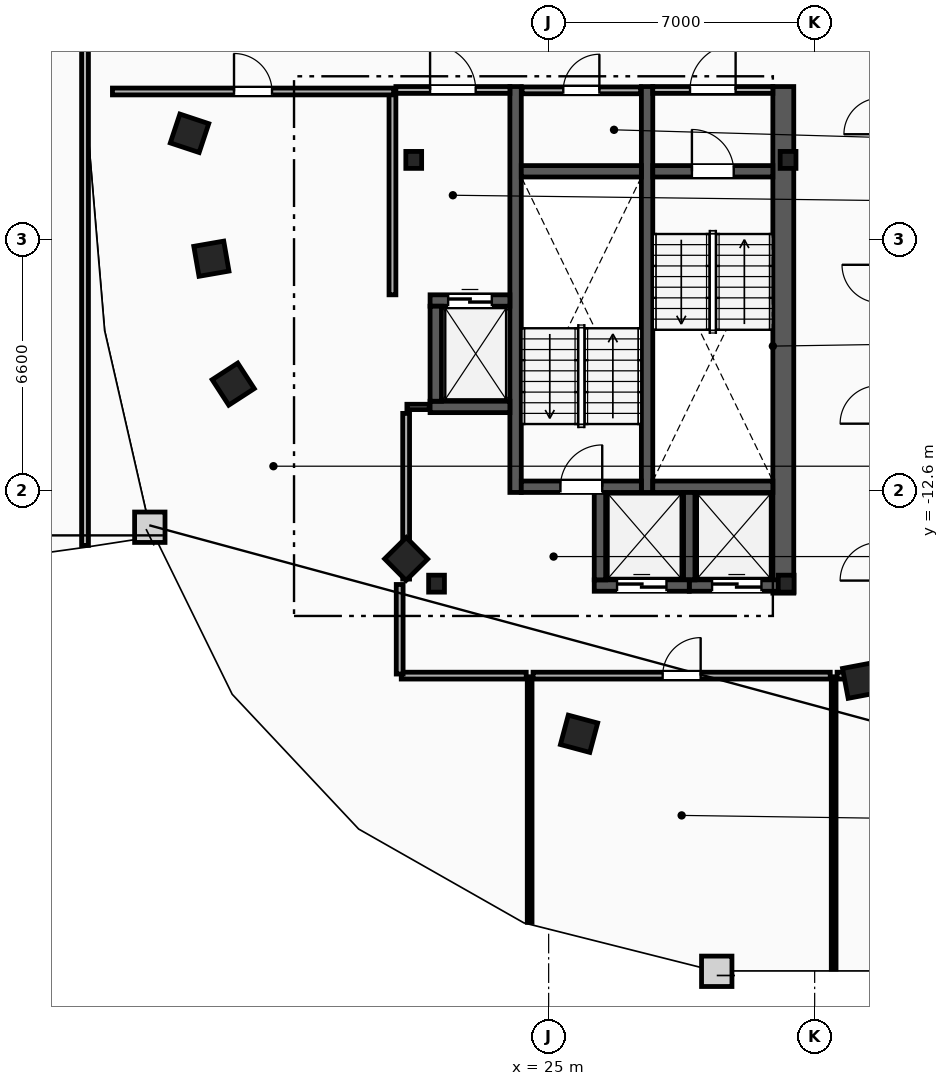
"""IFC4 building model, lengths in metres.
Left out: names, types, materials, properties, quantities, classifications, styles, units other than length and angle.
Written with IfcOpenShell. Run it as: python <this file> out.ifc"""

import sys

from ifc_helpers import new_model, si_unit, direction, frame, frame_2d, origin, origin_2d, place, context, subcontext, project, spatial, rectangle, i_section, extrude, element, fill, save


model = new_model("IFC4")
c1 = context("Model", 3, precision=1e-05, world=origin(), true_north=direction((0.0, 1.0)))
c2 = subcontext(c1, "Body", "Model", "MODEL_VIEW")
j1 = project(units=[si_unit("LENGTHUNIT", "METRE"), si_unit("PLANEANGLEUNIT", "RADIAN")], contexts=[c1])
p1 = place(None, origin())
s1 = spatial("IfcSite", under=j1, at=p1, CompositionType="ELEMENT")
p2 = place(p1, origin())
s2 = spatial("IfcBuilding", under=s1, at=p2, CompositionType="ELEMENT")
p3 = place(p2, frame((0.0, 0.0, 261.2)))
s3 = spatial("IfcBuildingStorey", under=s2, at=p3, CompositionType="ELEMENT", Elevation=261.2)
for number, where, z_axis, x_axis in (
    (1, (31.3, -3.9, 0.0), (0.0, 0.0, 1.0), (1.0, 0.0, 0.0)),
    (2, (21.45, -3.9, 0.0), (0.0, 0.0, 1.0), (1.0, 0.0, 0.0)),
    (3, (22.05, -15.05, 0.0), (0.0, 0.0, 1.0), (1.0, 0.0, 0.0)),
    (4, (31.25, -15.05, 0.0), (0.0, 0.0, 1.0), (1.0, 0.0, 0.0)),
):
    element("IfcColumn", number, at=place(p3, frame(where, z_axis=z_axis, x_axis=x_axis)), inside=s3, PredefinedType="COLUMN", context=c2, shape_type="SweptSolid", body=[
        extrude(i_section(OverallWidth=0.416, OverallDepth=0.446, WebThickness=0.039, FlangeThickness=0.063, FilletRadius=0.018, at=origin_2d()), origin(), (0.0, 0.0, 1.0), 3.6),
    ])
for number, where, z_axis, x_axis in (
    (5, (15.55, -3.2, 0.0), (0.0, 0.0, 1.0), (-0.315, -0.949, 0.0)),
    (6, (16.125, -6.5, 0.0), (0.0, 0.0, 1.0), (0.172, -0.985, 0.0)),
    (7, (16.7, -9.8, 0.0), (0.0, 0.0, 1.0), (0.544, -0.839, 0.0)),
    (8, (21.25, -14.4, 0.0), (0.0, 0.0, 1.0), (0.703, -0.711, 0.0)),
    (9, (25.8, -19.0, 0.0), (0.0, 0.0, 1.0), (0.966, -0.259, 0.0)),
    (10, (33.2, -17.6, 0.0), (0.0, 0.0, 1.0), (0.983, 0.186, 0.0)),
):
    element("IfcColumn", number, at=place(p3, frame(where, z_axis=z_axis, x_axis=x_axis)), inside=s3, PredefinedType="COLUMN", context=c2, shape_type="SweptSolid", body=[
        extrude(rectangle(XDim=0.8, YDim=0.8, at=origin_2d()), origin(), (0.0, 0.0, 1.0), 3.6),
    ])
p4 = place(p3, frame((31.175, -15.3, 0.0), z_axis=(0.0, 0.0, 1.0), x_axis=(0.0, 1.0, 0.0)))
e11 = element("IfcWall", 11, at=p4, inside=s3, PredefinedType="SHEAR", context=c2, shape_type="SweptSolid", body=[
    extrude(rectangle(XDim=13.33, YDim=0.55, at=frame_2d((6.665, 0.0))), origin(), (0.0, 0.0, 1.0), 3.34),
])
for number, where, z_axis, x_axis in (
    (12, (27.59, -12.65, 0.0), (0.0, 0.0, 1.0), (0.0, 1.0, 0.0)),
    (13, (24.13, -12.65, 0.0), (0.0, 0.0, 1.0), (0.0, 1.0, 0.0)),
):
    element("IfcWall", number, at=place(p3, frame(where, z_axis=z_axis, x_axis=x_axis)), inside=s3, PredefinedType="SHEAR", context=c2, shape_type="SweptSolid", body=[
        extrude(rectangle(XDim=10.68, YDim=0.3, at=frame_2d((5.34, 0.0))), origin(), (0.0, 0.0, 1.0), 3.34),
    ])
p5 = place(p3, frame((27.74, -4.2, 0.0), z_axis=(0.0, 0.0, 1.0), x_axis=(1.0, 0.0, 0.0)))
e14 = element("IfcWall", 14, at=p5, inside=s3, PredefinedType="SHEAR", context=c2, shape_type="SweptSolid", body=[
    extrude(rectangle(XDim=3.16, YDim=0.3, at=frame_2d((1.58, 0.0))), origin(), (0.0, 0.0, 1.0), 3.34),
])
p6 = place(p5, frame((1.03, 0.0, 0.0)))
e15 = element("IfcOpeningElement", 15, at=p6, cuts=e14, PredefinedType="OPENING", context=c2, shape_type="SweptSolid", body=[
    extrude(rectangle(XDim=1.1, YDim=2.15, at=frame_2d((0.55, 1.075))), frame((0.0, 0.16, 0.0), z_axis=(0.0, -1.0, 0.0), x_axis=(1.0, 0.0, 0.0)), (0.0, 0.0, 1.0), 0.32),
])
p7 = place(p3, frame((27.74, -12.5, 0.0), z_axis=(0.0, 0.0, 1.0), x_axis=(1.0, 0.0, 0.0)))
e16 = element("IfcWall", 16, at=p7, inside=s3, PredefinedType="SHEAR", context=c2, shape_type="SweptSolid", body=[
    extrude(rectangle(XDim=3.16, YDim=0.3, at=frame_2d((1.58, 0.0))), origin(), (0.0, 0.0, 1.0), 3.34),
])
p8 = place(p3, frame((24.28, -12.5, 0.0), z_axis=(0.0, 0.0, 1.0), x_axis=(1.0, 0.0, 0.0)))
e17 = element("IfcWall", 17, at=p8, inside=s3, PredefinedType="SHEAR", context=c2, shape_type="SweptSolid", body=[
    extrude(rectangle(XDim=3.16, YDim=0.3, at=frame_2d((1.58, 0.0))), origin(), (0.0, 0.0, 1.0), 3.34),
])
p9 = place(p8, frame((1.03, 0.0, 0.0)))
e18 = element("IfcOpeningElement", 18, at=p9, cuts=e17, PredefinedType="OPENING", context=c2, shape_type="SweptSolid", body=[
    extrude(rectangle(XDim=1.1, YDim=2.15, at=frame_2d((0.55, 1.075))), frame((0.0, 0.16, 0.0), z_axis=(0.0, -1.0, 0.0), x_axis=(1.0, 0.0, 0.0)), (0.0, 0.0, 1.0), 0.32),
])
p10 = place(p3, frame((24.28, -4.2, 0.0), z_axis=(0.0, 0.0, 1.0), x_axis=(1.0, 0.0, 0.0)))
e19 = element("IfcWall", 19, at=p10, inside=s3, PredefinedType="SHEAR", context=c2, shape_type="SweptSolid", body=[
    extrude(rectangle(XDim=3.16, YDim=0.3, at=frame_2d((1.58, 0.0))), origin(), (0.0, 0.0, 1.0), 3.34),
])
p11 = place(p3, frame((20.89, -7.45, 0.0), z_axis=(0.0, 0.0, 1.0), x_axis=(0.0, 1.0, 0.0)))
e20 = element("IfcWall", 20, at=p11, inside=s3, PredefinedType="PARTITIONING", context=c2, shape_type="SweptSolid", body=[
    extrude(rectangle(XDim=5.3, YDim=0.18, at=frame_2d((2.65, 0.0))), origin(), (0.0, 0.0, 1.0), 3.34),
])
p12 = place(p3, frame((20.98, -2.06, 0.0), z_axis=(0.0, 0.0, 1.0), x_axis=(1.0, 0.0, 0.0)))
e21 = element("IfcWall", 21, at=p12, inside=s3, PredefinedType="PARTITIONING", context=c2, shape_type="SweptSolid", body=[
    extrude(rectangle(XDim=3.0, YDim=0.18, at=frame_2d((1.5, 0.0))), origin(), (0.0, 0.0, 1.0), 3.34),
])
p13 = place(p12, frame((0.9, 0.0, 0.0)))
e22 = element("IfcOpeningElement", 22, at=p13, cuts=e21, PredefinedType="OPENING", context=c2, shape_type="SweptSolid", body=[
    extrude(rectangle(XDim=1.2, YDim=2.15, at=frame_2d((0.6, 1.075))), frame((0.0, 0.1, 0.0), z_axis=(0.0, -1.0, 0.0), x_axis=(1.0, 0.0, 0.0)), (0.0, 0.0, 1.0), 0.2),
])
p14 = place(p3, frame((27.74, -2.06, 0.0), z_axis=(0.0, 0.0, 1.0), x_axis=(1.0, 0.0, 0.0)))
e23 = element("IfcWall", 23, at=p14, inside=s3, PredefinedType="PARTITIONING", context=c2, shape_type="SweptSolid", body=[
    extrude(rectangle(XDim=3.16, YDim=0.18, at=frame_2d((1.58, 0.0))), origin(), (0.0, 0.0, 1.0), 3.34),
])
p15 = place(p14, frame((0.98, 0.0, 0.0)))
e24 = element("IfcOpeningElement", 24, at=p15, cuts=e23, PredefinedType="OPENING", context=c2, shape_type="SweptSolid", body=[
    extrude(rectangle(XDim=1.2, YDim=2.15, at=frame_2d((0.6, 1.075))), frame((0.0, 0.1, 0.0), z_axis=(0.0, -1.0, 0.0), x_axis=(1.0, 0.0, 0.0)), (0.0, 0.0, 1.0), 0.2),
])
p16 = place(p3, frame((21.88, -7.6, 0.0), z_axis=(0.0, 0.0, 1.0), x_axis=(1.0, 0.0, 0.0)))
e25 = element("IfcWall", 25, at=p16, inside=s3, PredefinedType="SHEAR", context=c2, shape_type="SweptSolid", body=[
    extrude(rectangle(XDim=2.1, YDim=0.3, at=frame_2d((1.05, 0.0))), origin(), (0.0, 0.0, 1.0), 3.34),
])
p17 = place(p16, frame((0.475, 0.0, 0.0)))
e26 = element("IfcOpeningElement", 26, at=p17, cuts=e25, PredefinedType="OPENING", context=c2, shape_type="SweptSolid", body=[
    extrude(rectangle(XDim=1.15, YDim=2.2, at=frame_2d((0.575, 1.1))), frame((0.0, 0.16, 0.0), z_axis=(0.0, -1.0, 0.0), x_axis=(1.0, 0.0, 0.0)), (0.0, 0.0, 1.0), 0.32),
])
p18 = place(p3, frame((21.88, -10.4, 0.0), z_axis=(0.0, 0.0, 1.0), x_axis=(1.0, 0.0, 0.0)))
e27 = element("IfcWall", 27, at=p18, inside=s3, PredefinedType="SHEAR", context=c2, shape_type="SweptSolid", body=[
    extrude(rectangle(XDim=2.1, YDim=0.3, at=frame_2d((1.05, 0.0))), origin(), (0.0, 0.0, 1.0), 3.34),
])
p19 = place(p3, frame((22.03, -10.25, 0.0), z_axis=(0.0, 0.0, 1.0), x_axis=(0.0, 1.0, 0.0)))
e28 = element("IfcWall", 28, at=p19, inside=s3, PredefinedType="SHEAR", context=c2, shape_type="SweptSolid", body=[
    extrude(rectangle(XDim=2.5, YDim=0.3, at=frame_2d((1.25, 0.0))), origin(), (0.0, 0.0, 1.0), 3.34),
])
p20 = place(p3, frame((28.7, -15.1, 0.0), z_axis=(0.0, 0.0, 1.0), x_axis=(1.0, 0.0, 0.0)))
e29 = element("IfcWall", 29, at=p20, inside=s3, PredefinedType="SHEAR", context=c2, shape_type="SweptSolid", body=[
    extrude(rectangle(XDim=2.5, YDim=0.3, at=frame_2d((1.25, 0.0))), origin(), (0.0, 0.0, 1.0), 3.34),
])
p21 = place(p20, frame((0.6, 0.0, 0.0)))
e30 = element("IfcOpeningElement", 30, at=p21, cuts=e29, PredefinedType="OPENING", context=c2, shape_type="SweptSolid", body=[
    extrude(rectangle(XDim=1.3, YDim=2.2, at=frame_2d((0.65, 1.1))), frame((0.0, 0.16, 0.0), z_axis=(0.0, -1.0, 0.0), x_axis=(1.0, 0.0, 0.0)), (0.0, 0.0, 1.0), 0.32),
])
p22 = place(p3, frame((28.7, -14.95, 0.0), z_axis=(0.0, 0.0, 1.0), x_axis=(0.0, 1.0, 0.0)))
e31 = element("IfcWall", 31, at=p22, inside=s3, PredefinedType="SHEAR", context=c2, shape_type="SweptSolid", body=[
    extrude(rectangle(XDim=2.3, YDim=0.3, at=frame_2d((1.15, 0.0))), origin(), (0.0, 0.0, 1.0), 3.34),
])
p23 = place(p3, frame((26.2, -15.1, 0.0), z_axis=(0.0, 0.0, 1.0), x_axis=(1.0, 0.0, 0.0)))
e32 = element("IfcWall", 32, at=p23, inside=s3, PredefinedType="SHEAR", context=c2, shape_type="SweptSolid", body=[
    extrude(rectangle(XDim=2.5, YDim=0.3, at=frame_2d((1.25, 0.0))), origin(), (0.0, 0.0, 1.0), 3.34),
])
p24 = place(p23, frame((0.6, 0.0, 0.0)))
e33 = element("IfcOpeningElement", 33, at=p24, cuts=e32, PredefinedType="OPENING", context=c2, shape_type="SweptSolid", body=[
    extrude(rectangle(XDim=1.3, YDim=2.2, at=frame_2d((0.65, 1.1))), frame((0.0, 0.16, 0.0), z_axis=(0.0, -1.0, 0.0), x_axis=(1.0, 0.0, 0.0)), (0.0, 0.0, 1.0), 0.32),
])
p25 = place(p3, frame((26.35, -14.95, 0.0), z_axis=(0.0, 0.0, 1.0), x_axis=(0.0, 1.0, 0.0)))
e34 = element("IfcWall", 34, at=p25, inside=s3, PredefinedType="SHEAR", context=c2, shape_type="SweptSolid", body=[
    extrude(rectangle(XDim=2.3, YDim=0.3, at=frame_2d((1.15, 0.0))), origin(), (0.0, 0.0, 1.0), 3.34),
])
p26 = place(p3, frame((21.27, -10.4, 0.0), z_axis=(0.0, 0.0, 1.0), x_axis=(1.0, 0.0, 0.0)))
e35 = element("IfcWall", 35, at=p26, inside=s3, PredefinedType="PARTITIONING", context=c2, shape_type="SweptSolid", body=[
    extrude(rectangle(XDim=0.59, YDim=0.14, at=frame_2d((0.295, 0.0))), origin(), (0.0, 0.0, 1.0), 3.34),
])
p27 = place(p3, frame((21.25, -14.93, 0.0), z_axis=(0.0, 0.0, 1.0), x_axis=(0.0, 1.0, 0.0)))
e36 = element("IfcWall", 36, at=p27, inside=s3, PredefinedType="PARTITIONING", context=c2, shape_type="SweptSolid", body=[
    extrude(rectangle(XDim=4.36, YDim=0.18, at=frame_2d((2.18, 0.0))), origin(), (0.0, 0.0, 1.0), 3.34),
])
p28 = place(p3, frame((24.3, -2.07, 0.0), z_axis=(0.0, 0.0, 1.0), x_axis=(1.0, 0.0, 0.0)))
e37 = element("IfcWall", 37, at=p28, inside=s3, PredefinedType="PARTITIONING", context=c2, shape_type="SweptSolid", body=[
    extrude(rectangle(XDim=3.12, YDim=0.18, at=frame_2d((1.56, 0.0))), origin(), (0.0, 0.0, 1.0), 3.34),
])
p29 = place(p28, frame((1.085, 0.0, 0.0)))
e38 = element("IfcOpeningElement", 38, at=p29, cuts=e37, PredefinedType="OPENING", context=c2, shape_type="SweptSolid", body=[
    extrude(rectangle(XDim=0.95, YDim=2.1, at=frame_2d((0.475, 1.05))), frame((0.0, 0.1, 0.0), z_axis=(0.0, -1.0, 0.0), x_axis=(1.0, 0.0, 0.0)), (0.0, 0.0, 1.0), 0.2),
])
p30 = place(p3, frame((24.5, -23.963, 0.0), z_axis=(0.0, 0.0, 1.0), x_axis=(0.0, 1.0, 0.0)))
e39 = element("IfcWall", 39, at=p30, inside=s3, PredefinedType="PARTITIONING", context=c2, shape_type="SweptSolid", body=[
    extrude(rectangle(XDim=6.463, YDim=0.125, at=frame_2d((3.231, 0.0))), origin(), (0.0, 0.0, 1.0), 3.34),
])
p31 = place(p3, frame((32.5, -25.19, 0.0), z_axis=(0.0, 0.0, 1.0), x_axis=(0.0, 1.0, 0.0)))
e40 = element("IfcWall", 40, at=p31, inside=s3, PredefinedType="PARTITIONING", context=c2, shape_type="SweptSolid", body=[
    extrude(rectangle(XDim=7.69, YDim=0.125, at=frame_2d((3.845, 0.0))), origin(), (0.0, 0.0, 1.0), 3.34),
])
p32 = place(p3, frame((24.59, -17.47, 0.0), z_axis=(0.0, 0.0, 1.0), x_axis=(1.0, 0.0, 0.0)))
e41 = element("IfcWall", 41, at=p32, inside=s3, PredefinedType="PARTITIONING", context=c2, shape_type="SweptSolid", body=[
    extrude(rectangle(XDim=7.82, YDim=0.18, at=frame_2d((3.91, 0.0))), origin(), (0.0, 0.0, 1.0), 3.34),
])
p33 = place(p32, frame((3.41, 0.0, 0.0)))
e42 = element("IfcOpeningElement", 42, at=p33, cuts=e41, PredefinedType="OPENING", context=c2, shape_type="SweptSolid", body=[
    extrude(rectangle(XDim=1.0, YDim=2.15, at=frame_2d((0.5, 1.075))), frame((0.0, 0.1, 0.0), z_axis=(0.0, -1.0, 0.0), x_axis=(1.0, 0.0, 0.0)), (0.0, 0.0, 1.0), 0.2),
])
p34 = place(p3, frame((32.59, -17.47, 0.0), z_axis=(0.0, 0.0, 1.0), x_axis=(1.0, 0.0, 0.0)))
e43 = element("IfcWall", 43, at=p34, inside=s3, PredefinedType="PARTITIONING", context=c2, shape_type="SweptSolid", body=[
    extrude(rectangle(XDim=1.038, YDim=0.18, at=frame_2d((0.519, 0.0))), origin(), (0.0, 0.0, 1.0), 3.34),
])
p35 = place(p3, frame((13.521, -2.1, 0.0), z_axis=(0.0, 0.0, 1.0), x_axis=(1.0, 0.0, 0.0)))
e44 = element("IfcWall", 44, at=p35, inside=s3, PredefinedType="PARTITIONING", context=c2, shape_type="SweptSolid", body=[
    extrude(rectangle(XDim=7.398, YDim=0.18, at=frame_2d((3.699, 0.0))), origin(), (0.0, 0.0, 1.0), 3.34),
])
p36 = place(p35, frame((3.199, 0.0, 0.0)))
e45 = element("IfcOpeningElement", 45, at=p36, cuts=e44, PredefinedType="OPENING", context=c2, shape_type="SweptSolid", body=[
    extrude(rectangle(XDim=1.0, YDim=2.15, at=frame_2d((0.5, 1.075))), frame((0.0, 0.1, 0.0), z_axis=(0.0, -1.0, 0.0), x_axis=(1.0, 0.0, 0.0)), (0.0, 0.0, 1.0), 0.2),
])
p37 = place(p3, frame((21.122, -17.47, 0.0), z_axis=(0.0, 0.0, 1.0), x_axis=(1.0, 0.0, 0.0)))
e46 = element("IfcWall", 46, at=p37, inside=s3, PredefinedType="PARTITIONING", context=c2, shape_type="SweptSolid", body=[
    extrude(rectangle(XDim=3.288, YDim=0.18, at=frame_2d((1.644, 0.0))), origin(), (0.0, 0.0, 1.0), 3.34),
])
p38 = place(p3, frame((21.08, -15.072, 0.0), z_axis=(0.0, 0.0, 1.0), x_axis=(0.0, -1.0, 0.0)))
e47 = element("IfcWall", 47, at=p38, inside=s3, PredefinedType="PARTITIONING", context=c2, shape_type="SweptSolid", body=[
    extrude(rectangle(XDim=2.357, YDim=0.18, at=frame_2d((1.178, 0.0))), origin(), (0.0, 0.0, 1.0), 3.34),
])
p39 = place(p3, frame((12.8, -14.044, 0.0), z_axis=(0.0, 0.0, 1.0), x_axis=(0.0, 1.0, 0.0)))
e48 = element("IfcWall", 48, at=p39, inside=s3, PredefinedType="PARTITIONING", context=c2, shape_type="SweptSolid", body=[
    extrude(rectangle(XDim=15.204, YDim=0.18, at=frame_2d((7.602, 0.0))), origin(), (0.0, 0.0, 1.0), 3.34),
])
p40 = place(p6, origin())
e49 = element("IfcDoor", 49, at=p40, inside=s3, OperationType="SINGLE_SWING_LEFT", PredefinedType="DOOR", context=c2, shape_type="SweptSolid", body=[
    extrude(rectangle(XDim=1.1, YDim=2.15, at=frame_2d((0.55, 1.075))), frame((0.0, 0.025, 0.0), z_axis=(0.0, -1.0, 0.0), x_axis=(1.0, 0.0, 0.0)), (0.0, 0.0, 1.0), 0.05),
])
fill(e15, e49)
p41 = place(p9, origin())
e50 = element("IfcDoor", 50, at=p41, inside=s3, OperationType="SINGLE_SWING_RIGHT", PredefinedType="DOOR", context=c2, shape_type="SweptSolid", body=[
    extrude(rectangle(XDim=1.1, YDim=2.15, at=frame_2d((0.55, 1.075))), frame((0.0, 0.025, 0.0), z_axis=(0.0, -1.0, 0.0), x_axis=(1.0, 0.0, 0.0)), (0.0, 0.0, 1.0), 0.05),
])
fill(e18, e50)
p42 = place(p13, origin())
e51 = element("IfcDoor", 51, at=p42, inside=s3, OperationType="SINGLE_SWING_LEFT", PredefinedType="DOOR", context=c2, shape_type="SweptSolid", body=[
    extrude(rectangle(XDim=1.2, YDim=2.15, at=frame_2d((0.6, 1.075))), frame((0.0, 0.025, 0.0), z_axis=(0.0, -1.0, 0.0), x_axis=(1.0, 0.0, 0.0)), (0.0, 0.0, 1.0), 0.05),
])
fill(e22, e51)
p43 = place(p15, origin())
e52 = element("IfcDoor", 52, at=p43, inside=s3, OperationType="SINGLE_SWING_RIGHT", PredefinedType="DOOR", context=c2, shape_type="SweptSolid", body=[
    extrude(rectangle(XDim=1.2, YDim=2.15, at=frame_2d((0.6, 1.075))), frame((0.0, 0.025, 0.0), z_axis=(0.0, -1.0, 0.0), x_axis=(1.0, 0.0, 0.0)), (0.0, 0.0, 1.0), 0.05),
])
fill(e24, e52)
p44 = place(p17, origin())
e53 = element("IfcDoor", 53, at=p44, inside=s3, OperationType="SLIDING_TO_LEFT", PredefinedType="TRAPDOOR", context=c2, shape_type="SweptSolid", body=[
    extrude(rectangle(XDim=1.15, YDim=2.2, at=frame_2d((0.575, 1.1))), frame((0.0, 0.025, 0.0), z_axis=(0.0, -1.0, 0.0), x_axis=(1.0, 0.0, 0.0)), (0.0, 0.0, 1.0), 0.05),
])
fill(e26, e53)
p45 = place(p21, origin())
e54 = element("IfcDoor", 54, at=p45, inside=s3, OperationType="SLIDING_TO_LEFT", PredefinedType="TRAPDOOR", context=c2, shape_type="SweptSolid", body=[
    extrude(rectangle(XDim=1.3, YDim=2.2, at=frame_2d((0.65, 1.1))), frame((0.0, 0.025, 0.0), z_axis=(0.0, -1.0, 0.0), x_axis=(1.0, 0.0, 0.0)), (0.0, 0.0, 1.0), 0.05),
])
fill(e30, e54)
p46 = place(p24, origin())
e55 = element("IfcDoor", 55, at=p46, inside=s3, OperationType="SLIDING_TO_LEFT", PredefinedType="TRAPDOOR", context=c2, shape_type="SweptSolid", body=[
    extrude(rectangle(XDim=1.3, YDim=2.2, at=frame_2d((0.65, 1.1))), frame((0.0, 0.025, 0.0), z_axis=(0.0, -1.0, 0.0), x_axis=(1.0, 0.0, 0.0)), (0.0, 0.0, 1.0), 0.05),
])
fill(e33, e55)
p47 = place(p33, origin())
e56 = element("IfcDoor", 56, at=p47, inside=s3, OperationType="SINGLE_SWING_RIGHT", PredefinedType="DOOR", context=c2, shape_type="SweptSolid", body=[
    extrude(rectangle(XDim=1.0, YDim=2.15, at=frame_2d((0.5, 1.075))), frame((0.0, 0.025, 0.0), z_axis=(0.0, -1.0, 0.0), x_axis=(1.0, 0.0, 0.0)), (0.0, 0.0, 1.0), 0.05),
])
fill(e42, e56)
p48 = place(p36, origin())
e57 = element("IfcDoor", 57, at=p48, inside=s3, OperationType="SINGLE_SWING_LEFT", PredefinedType="DOOR", context=c2, shape_type="SweptSolid", body=[
    extrude(rectangle(XDim=1.0, YDim=2.15, at=frame_2d((0.5, 1.075))), frame((0.0, 0.025, 0.0), z_axis=(0.0, -1.0, 0.0), x_axis=(1.0, 0.0, 0.0)), (0.0, 0.0, 1.0), 0.05),
])
fill(e45, e57)
p49 = place(p29, origin())
e58 = element("IfcDoor", 58, at=p49, inside=s3, OperationType="SINGLE_SWING_RIGHT", PredefinedType="DOOR", context=c2, shape_type="SweptSolid", body=[
    extrude(rectangle(XDim=0.95, YDim=2.1, at=frame_2d((0.475, 1.05))), frame((0.0, 0.025, 0.0), z_axis=(0.0, -1.0, 0.0), x_axis=(1.0, 0.0, 0.0)), (0.0, 0.0, 1.0), 0.05),
])
fill(e38, e58)
save(model, sys.argv[1])
